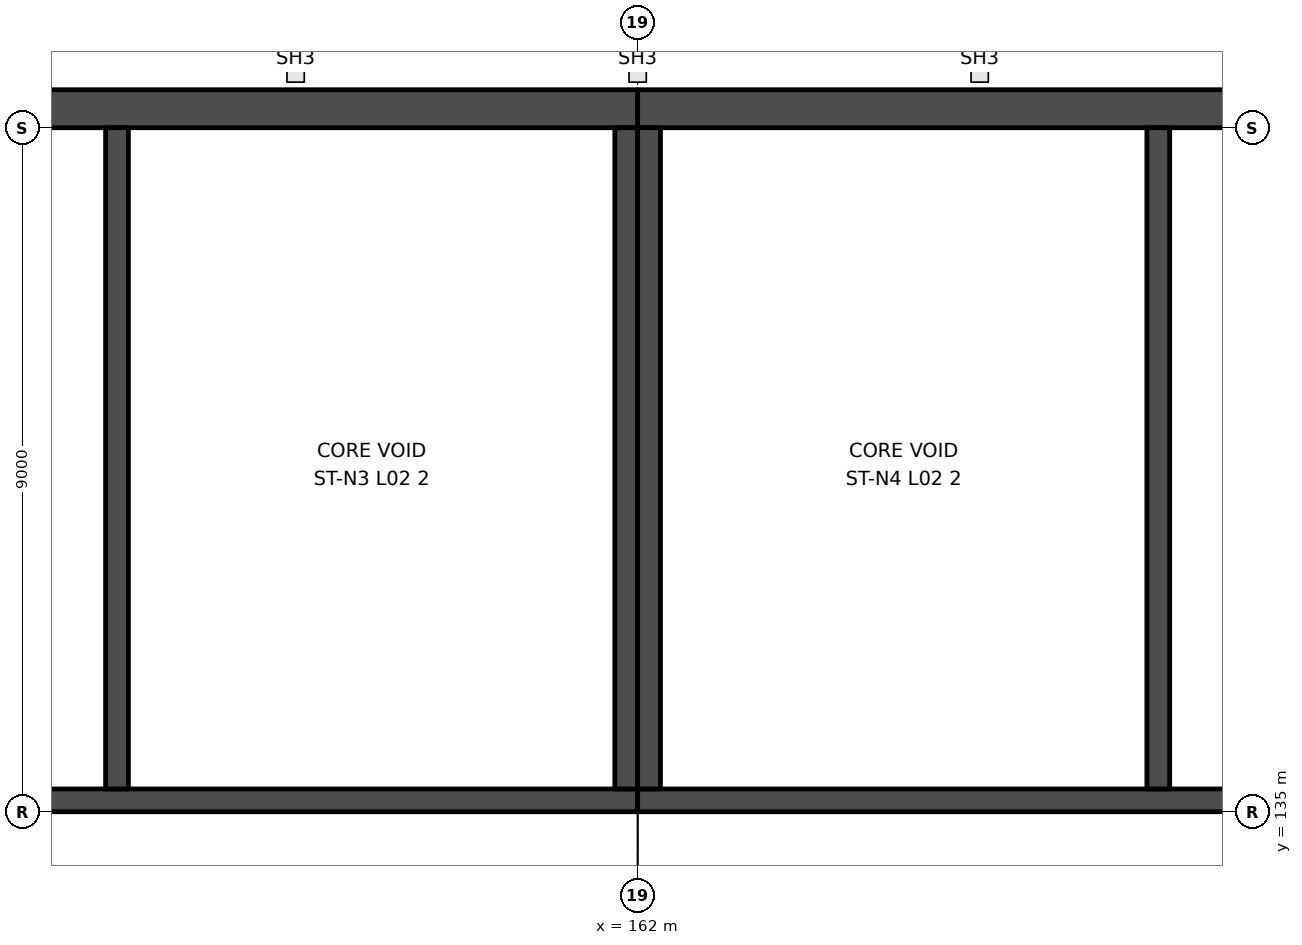
"""IFC4 building model, lengths in metres.
Left out: names, types, materials, properties, quantities, classifications, styles, units other than length and angle.
Written with IfcOpenShell. Run it as: python <this file> out.ifc"""

import sys

from ifc_helpers import new_model, si_unit, direction, frame, frame_2d, origin, place, context, subcontext, project, spatial, rectangle, extrude, element, save


model = new_model("IFC4")
c1 = context("Model", 3, precision=1e-05, world=origin(), true_north=direction((0.0, 1.0)))
c2 = subcontext(c1, "Body", "Model", "MODEL_VIEW")
j1 = project(units=[si_unit("LENGTHUNIT", "METRE"), si_unit("PLANEANGLEUNIT", "RADIAN")], contexts=[c1])
p1 = place(None, origin())
s1 = spatial("IfcSite", under=j1, at=p1, CompositionType="ELEMENT")
p2 = place(p1, origin())
s2 = spatial("IfcBuilding", under=s1, at=p2, CompositionType="ELEMENT")
p3 = place(p2, frame((0.0, 0.0, 11.5)))
s3 = spatial("IfcBuildingStorey", under=s2, at=p3, CompositionType="ELEMENT", Elevation=11.5)
p4 = place(p3, frame((144.0, 135.15, 0.0), z_axis=(0.0, 0.0, 1.0), x_axis=(1.0, 0.0, 0.0)))
e1 = element("IfcWall", 1, at=p4, inside=s3, PredefinedType="SHEAR", context=c2, shape_type="SweptSolid", body=[
    extrude(rectangle(XDim=18.0, YDim=0.3, at=frame_2d((9.0, 0.0))), origin(), (0.0, 0.0, 1.0), 10.5),
])
p5 = place(p4, frame((1.5, 0.0, 0.0)))
e2 = element("IfcOpeningElement", 2, at=p5, cuts=e1, PredefinedType="OPENING", context=c2, shape_type="SweptSolid", body=[
    extrude(rectangle(XDim=1.2, YDim=2.1, at=frame_2d((0.6, 1.05))), frame((0.0, 0.16, 0.0), z_axis=(0.0, -1.0, 0.0), x_axis=(1.0, 0.0, 0.0)), (0.0, 0.0, 1.0), 0.32),
])
p6 = place(p3, frame((144.0, 144.25, 0.0), z_axis=(0.0, 0.0, 1.0), x_axis=(1.0, 0.0, 0.0)))
e3 = element("IfcWall", 3, at=p6, inside=s3, PredefinedType="SHEAR", context=c2, shape_type="SweptSolid", body=[
    extrude(rectangle(XDim=18.0, YDim=0.5, at=frame_2d((9.0, 0.0))), origin(), (0.0, 0.0, 1.0), 10.5),
])
for number, where, z_axis, x_axis in (
    (4, (161.85, 135.3, 0.0), (0.0, 0.0, 1.0), (0.0, 1.0, 0.0)),
    (5, (155.15, 135.3, 0.0), (0.0, 0.0, 1.0), (0.0, 1.0, 0.0)),
):
    element("IfcWall", number, at=place(p3, frame(where, z_axis=z_axis, x_axis=x_axis)), inside=s3, PredefinedType="SHEAR", context=c2, shape_type="SweptSolid", body=[
        extrude(rectangle(XDim=8.7, YDim=0.3, at=frame_2d((4.35, 0.0))), origin(), (0.0, 0.0, 1.0), 10.5),
    ])
p7 = place(p3, frame((180.0, 135.15, 0.0), z_axis=(0.0, 0.0, 1.0), x_axis=(-1.0, 0.0, 0.0)))
e6 = element("IfcWall", 6, at=p7, inside=s3, PredefinedType="SHEAR", context=c2, shape_type="SweptSolid", body=[
    extrude(rectangle(XDim=18.0, YDim=0.3, at=frame_2d((9.0, 0.0))), origin(), (0.0, 0.0, 1.0), 10.5),
])
p8 = place(p7, frame((8.6, 0.0, 0.0)))
e7 = element("IfcOpeningElement", 7, at=p8, cuts=e6, PredefinedType="OPENING", context=c2, shape_type="SweptSolid", body=[
    extrude(rectangle(XDim=1.2, YDim=2.1, at=frame_2d((0.6, 1.05))), frame((0.0, 0.16, 0.0), z_axis=(0.0, -1.0, 0.0), x_axis=(1.0, 0.0, 0.0)), (0.0, 0.0, 1.0), 0.32),
])
p9 = place(p3, frame((180.0, 144.25, 0.0), z_axis=(0.0, 0.0, 1.0), x_axis=(-1.0, 0.0, 0.0)))
e8 = element("IfcWall", 8, at=p9, inside=s3, PredefinedType="SHEAR", context=c2, shape_type="SweptSolid", body=[
    extrude(rectangle(XDim=18.0, YDim=0.5, at=frame_2d((9.0, 0.0))), origin(), (0.0, 0.0, 1.0), 10.5),
])
for number, where, z_axis, x_axis in (
    (9, (162.15, 135.3, 0.0), (0.0, 0.0, 1.0), (0.0, 1.0, 0.0)),
    (10, (168.85, 135.3, 0.0), (0.0, 0.0, 1.0), (0.0, 1.0, 0.0)),
):
    element("IfcWall", number, at=place(p3, frame(where, z_axis=z_axis, x_axis=x_axis)), inside=s3, PredefinedType="SHEAR", context=c2, shape_type="SweptSolid", body=[
        extrude(rectangle(XDim=8.7, YDim=0.3, at=frame_2d((4.35, 0.0))), origin(), (0.0, 0.0, 1.0), 10.5),
    ])
save(model, sys.argv[1])
